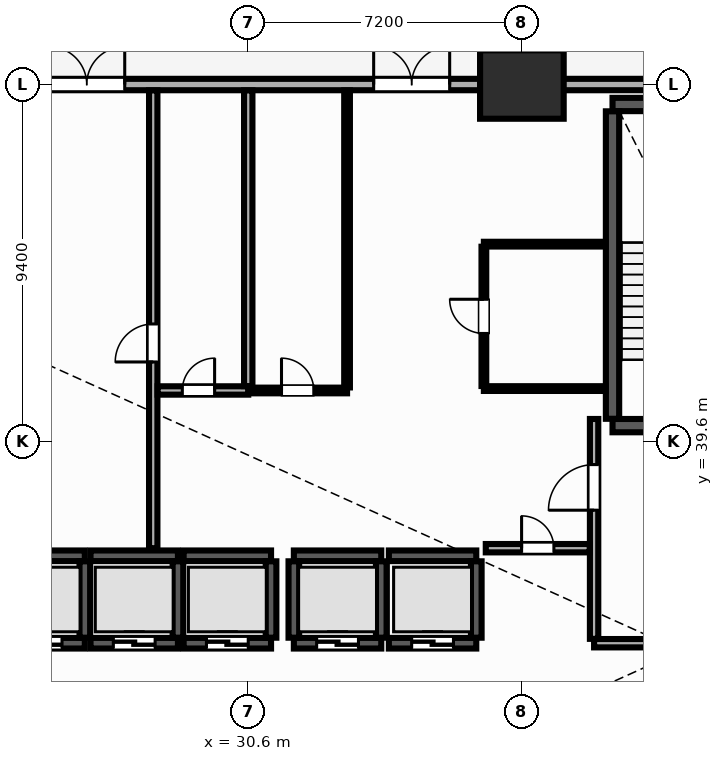
"""IFC4 building model, lengths in metres.
Left out: names, types, materials, properties, quantities, classifications, styles, units other than length and angle.
Written with IfcOpenShell. Run it as: python <this file> out.ifc"""

import sys

from ifc_helpers import new_model, si_unit, direction, frame, frame_2d, origin, origin_2d, place, context, subcontext, project, spatial, rectangle, extrude, element, fill, save


model = new_model("IFC4")
c1 = context("Model", 3, precision=1e-05, world=origin(), true_north=direction((0.0, 1.0)))
c2 = subcontext(c1, "Body", "Model", "MODEL_VIEW")
j1 = project(units=[si_unit("LENGTHUNIT", "METRE"), si_unit("PLANEANGLEUNIT", "RADIAN")], contexts=[c1])
p1 = place(None, origin())
s1 = spatial("IfcSite", under=j1, at=p1, CompositionType="ELEMENT")
p2 = place(p1, origin())
s2 = spatial("IfcBuilding", under=s1, at=p2, CompositionType="ELEMENT")
p3 = place(p2, origin())
s3 = spatial("IfcBuildingStorey", under=s2, at=p3, CompositionType="ELEMENT", Elevation=0.0)
p4 = place(p3, frame((37.8, 49.0, 0.0), z_axis=(0.0, 0.0, 1.0), x_axis=(1.0, 0.0, 0.0)))
e1 = element("IfcColumn", 1, at=p4, inside=s3, PredefinedType="USERDEFINED", context=c2, shape_type="SweptSolid", body=[
    extrude(rectangle(XDim=2.2, YDim=1.8, at=origin_2d()), origin(), (0.0, 0.0, 1.0), 7.68),
])
p5 = place(p3, frame((73.5, 49.0, 0.0), z_axis=(0.0, 0.0, 1.0), x_axis=(-1.0, 0.0, 0.0)))
e2 = element("IfcWall", 2, at=p5, inside=s3, PredefinedType="SOLIDWALL", context=c2, shape_type="SweptSolid", body=[
    extrude(rectangle(XDim=63.0, YDim=0.3, at=frame_2d((31.5, 0.0))), origin(), (0.0, 0.0, 1.0), 5.4),
])
p6 = place(p5, frame((46.15, 0.0, 0.0)))
e3 = element("IfcOpeningElement", 3, at=p6, cuts=e2, PredefinedType="OPENING", context=c2, shape_type="SweptSolid", body=[
    extrude(rectangle(XDim=2.0, YDim=2.4, at=frame_2d((1.0, 1.2))), frame((0.0, 0.16, 0.0), z_axis=(0.0, -1.0, 0.0), x_axis=(1.0, 0.0, 0.0)), (0.0, 0.0, 1.0), 0.32),
])
p7 = place(p5, frame((37.6, 0.0, 0.0)))
e4 = element("IfcOpeningElement", 4, at=p7, cuts=e2, PredefinedType="OPENING", context=c2, shape_type="SweptSolid", body=[
    extrude(rectangle(XDim=2.0, YDim=2.4, at=frame_2d((1.0, 1.2))), frame((0.0, 0.16, 0.0), z_axis=(0.0, -1.0, 0.0), x_axis=(1.0, 0.0, 0.0)), (0.0, 0.0, 1.0), 0.32),
])
p8 = place(p5, frame((16.65, 0.0, 0.0)))
e5 = element("IfcOpeningElement", 5, at=p8, cuts=e2, PredefinedType="OPENING", context=c2, shape_type="SweptSolid", body=[
    extrude(rectangle(XDim=2.0, YDim=2.4, at=frame_2d((1.0, 1.2))), frame((0.0, 0.16, 0.0), z_axis=(0.0, -1.0, 0.0), x_axis=(1.0, 0.0, 0.0)), (0.0, 0.0, 1.0), 0.32),
])
p9 = place(p3, frame((40.185, 40.025, 0.0), z_axis=(0.0, 0.0, 1.0), x_axis=(1.0, 0.0, 0.0)))
e6 = element("IfcWall", 6, at=p9, inside=s3, PredefinedType="SHEAR", context=c2, shape_type="SweptSolid", body=[
    extrude(rectangle(XDim=3.63, YDim=0.35, at=frame_2d((1.815, 0.0))), origin(), (0.0, 0.0, 1.0), 7.68),
])
p10 = place(p9, frame((1.24, 0.0, 0.0)))
e7 = element("IfcOpeningElement", 7, at=p10, cuts=e6, PredefinedType="OPENING", context=c2, shape_type="SweptSolid", body=[
    extrude(rectangle(XDim=1.15, YDim=2.15, at=frame_2d((0.575, 1.075))), frame((0.0, 0.185, 0.0), z_axis=(0.0, -1.0, 0.0), x_axis=(1.0, 0.0, 0.0)), (0.0, 0.0, 1.0), 0.37),
])
p11 = place(p3, frame((40.185, 48.475, 0.0), z_axis=(0.0, 0.0, 1.0), x_axis=(1.0, 0.0, 0.0)))
e8 = element("IfcWall", 8, at=p11, inside=s3, PredefinedType="SHEAR", context=c2, shape_type="SweptSolid", body=[
    extrude(rectangle(XDim=3.63, YDim=0.35, at=frame_2d((1.815, 0.0))), origin(), (0.0, 0.0, 1.0), 7.68),
])
p12 = place(p3, frame((40.185, 40.205, 0.0), z_axis=(0.0, 0.0, 1.0), x_axis=(0.0, 1.0, 0.0)))
e9 = element("IfcWall", 9, at=p12, inside=s3, PredefinedType="SHEAR", context=c2, shape_type="SweptSolid", body=[
    extrude(rectangle(XDim=8.09, YDim=0.35, at=frame_2d((4.045, 0.0))), origin(), (0.0, 0.0, 1.0), 7.68),
])
p13 = place(p3, frame((24.0, 34.3, 0.0), z_axis=(0.0, 0.0, 1.0), x_axis=(1.0, 0.0, 0.0)))
e10 = element("IfcWall", 10, at=p13, inside=s3, PredefinedType="SHEAR", context=c2, shape_type="SweptSolid", body=[
    extrude(rectangle(XDim=2.3, YDim=0.28, at=frame_2d((1.15, 0.0))), origin(), (0.0, 0.0, 1.0), 7.68),
])
p14 = place(p13, frame((0.6, 0.0, 0.0)))
e11 = element("IfcOpeningElement", 11, at=p14, cuts=e10, PredefinedType="OPENING", context=c2, shape_type="SweptSolid", body=[
    extrude(rectangle(XDim=1.1, YDim=2.2, at=frame_2d((0.55, 1.1))), frame((0.0, 0.15, 0.0), z_axis=(0.0, -1.0, 0.0), x_axis=(1.0, 0.0, 0.0)), (0.0, 0.0, 1.0), 0.3),
])
p15 = place(p3, frame((24.0, 36.6, 0.0), z_axis=(0.0, 0.0, 1.0), x_axis=(1.0, 0.0, 0.0)))
e12 = element("IfcWall", 12, at=p15, inside=s3, PredefinedType="SHEAR", context=c2, shape_type="SweptSolid", body=[
    extrude(rectangle(XDim=2.3, YDim=0.28, at=frame_2d((1.15, 0.0))), origin(), (0.0, 0.0, 1.0), 7.68),
])
p16 = place(p3, frame((26.3, 34.445, 0.0), z_axis=(0.0, 0.0, 1.0), x_axis=(0.0, 1.0, 0.0)))
e13 = element("IfcWall", 13, at=p16, inside=s3, PredefinedType="SHEAR", context=c2, shape_type="SweptSolid", body=[
    extrude(rectangle(XDim=2.01, YDim=0.28, at=frame_2d((1.005, 0.0))), origin(), (0.0, 0.0, 1.0), 7.68),
])
p17 = place(p3, frame((26.45, 34.3, 0.0), z_axis=(0.0, 0.0, 1.0), x_axis=(1.0, 0.0, 0.0)))
e14 = element("IfcWall", 14, at=p17, inside=s3, PredefinedType="SHEAR", context=c2, shape_type="SweptSolid", body=[
    extrude(rectangle(XDim=2.3, YDim=0.28, at=frame_2d((1.15, 0.0))), origin(), (0.0, 0.0, 1.0), 7.68),
])
p18 = place(p17, frame((0.6, 0.0, 0.0)))
e15 = element("IfcOpeningElement", 15, at=p18, cuts=e14, PredefinedType="OPENING", context=c2, shape_type="SweptSolid", body=[
    extrude(rectangle(XDim=1.1, YDim=2.2, at=frame_2d((0.55, 1.1))), frame((0.0, 0.15, 0.0), z_axis=(0.0, -1.0, 0.0), x_axis=(1.0, 0.0, 0.0)), (0.0, 0.0, 1.0), 0.3),
])
p19 = place(p3, frame((26.45, 36.6, 0.0), z_axis=(0.0, 0.0, 1.0), x_axis=(1.0, 0.0, 0.0)))
e16 = element("IfcWall", 16, at=p19, inside=s3, PredefinedType="SHEAR", context=c2, shape_type="SweptSolid", body=[
    extrude(rectangle(XDim=2.3, YDim=0.28, at=frame_2d((1.15, 0.0))), origin(), (0.0, 0.0, 1.0), 7.68),
])
p20 = place(p3, frame((28.75, 34.445, 0.0), z_axis=(0.0, 0.0, 1.0), x_axis=(0.0, 1.0, 0.0)))
e17 = element("IfcWall", 17, at=p20, inside=s3, PredefinedType="SHEAR", context=c2, shape_type="SweptSolid", body=[
    extrude(rectangle(XDim=2.01, YDim=0.28, at=frame_2d((1.005, 0.0))), origin(), (0.0, 0.0, 1.0), 7.68),
])
p21 = place(p3, frame((28.9, 34.3, 0.0), z_axis=(0.0, 0.0, 1.0), x_axis=(1.0, 0.0, 0.0)))
e18 = element("IfcWall", 18, at=p21, inside=s3, PredefinedType="SHEAR", context=c2, shape_type="SweptSolid", body=[
    extrude(rectangle(XDim=2.3, YDim=0.28, at=frame_2d((1.15, 0.0))), origin(), (0.0, 0.0, 1.0), 7.68),
])
p22 = place(p21, frame((0.6, 0.0, 0.0)))
e19 = element("IfcOpeningElement", 19, at=p22, cuts=e18, PredefinedType="OPENING", context=c2, shape_type="SweptSolid", body=[
    extrude(rectangle(XDim=1.1, YDim=2.2, at=frame_2d((0.55, 1.1))), frame((0.0, 0.15, 0.0), z_axis=(0.0, -1.0, 0.0), x_axis=(1.0, 0.0, 0.0)), (0.0, 0.0, 1.0), 0.3),
])
p23 = place(p3, frame((28.9, 36.6, 0.0), z_axis=(0.0, 0.0, 1.0), x_axis=(1.0, 0.0, 0.0)))
e20 = element("IfcWall", 20, at=p23, inside=s3, PredefinedType="SHEAR", context=c2, shape_type="SweptSolid", body=[
    extrude(rectangle(XDim=2.3, YDim=0.28, at=frame_2d((1.15, 0.0))), origin(), (0.0, 0.0, 1.0), 7.68),
])
p24 = place(p3, frame((31.2, 34.445, 0.0), z_axis=(0.0, 0.0, 1.0), x_axis=(0.0, 1.0, 0.0)))
e21 = element("IfcWall", 21, at=p24, inside=s3, PredefinedType="SHEAR", context=c2, shape_type="SweptSolid", body=[
    extrude(rectangle(XDim=2.01, YDim=0.28, at=frame_2d((1.005, 0.0))), origin(), (0.0, 0.0, 1.0), 7.68),
])
p25 = place(p3, frame((31.8, 34.3, 0.0), z_axis=(0.0, 0.0, 1.0), x_axis=(1.0, 0.0, 0.0)))
e22 = element("IfcWall", 22, at=p25, inside=s3, PredefinedType="SHEAR", context=c2, shape_type="SweptSolid", body=[
    extrude(rectangle(XDim=2.3, YDim=0.28, at=frame_2d((1.15, 0.0))), origin(), (0.0, 0.0, 1.0), 7.68),
])
p26 = place(p25, frame((0.6, 0.0, 0.0)))
e23 = element("IfcOpeningElement", 23, at=p26, cuts=e22, PredefinedType="OPENING", context=c2, shape_type="SweptSolid", body=[
    extrude(rectangle(XDim=1.1, YDim=2.2, at=frame_2d((0.55, 1.1))), frame((0.0, 0.15, 0.0), z_axis=(0.0, -1.0, 0.0), x_axis=(1.0, 0.0, 0.0)), (0.0, 0.0, 1.0), 0.3),
])
p27 = place(p3, frame((31.8, 36.6, 0.0), z_axis=(0.0, 0.0, 1.0), x_axis=(1.0, 0.0, 0.0)))
e24 = element("IfcWall", 24, at=p27, inside=s3, PredefinedType="SHEAR", context=c2, shape_type="SweptSolid", body=[
    extrude(rectangle(XDim=2.3, YDim=0.28, at=frame_2d((1.15, 0.0))), origin(), (0.0, 0.0, 1.0), 7.68),
])
for number, where, z_axis, x_axis in (
    (25, (31.8, 34.445, 0.0), (0.0, 0.0, 1.0), (0.0, 1.0, 0.0)),
    (26, (34.1, 34.445, 0.0), (0.0, 0.0, 1.0), (0.0, 1.0, 0.0)),
):
    element("IfcWall", number, at=place(p3, frame(where, z_axis=z_axis, x_axis=x_axis)), inside=s3, PredefinedType="SHEAR", context=c2, shape_type="SweptSolid", body=[
        extrude(rectangle(XDim=2.01, YDim=0.28, at=frame_2d((1.005, 0.0))), origin(), (0.0, 0.0, 1.0), 7.68),
    ])
p28 = place(p3, frame((34.3, 34.3, 0.0), z_axis=(0.0, 0.0, 1.0), x_axis=(1.0, 0.0, 0.0)))
e27 = element("IfcWall", 27, at=p28, inside=s3, PredefinedType="SHEAR", context=c2, shape_type="SweptSolid", body=[
    extrude(rectangle(XDim=2.3, YDim=0.28, at=frame_2d((1.15, 0.0))), origin(), (0.0, 0.0, 1.0), 7.68),
])
p29 = place(p28, frame((0.6, 0.0, 0.0)))
e28 = element("IfcOpeningElement", 28, at=p29, cuts=e27, PredefinedType="OPENING", context=c2, shape_type="SweptSolid", body=[
    extrude(rectangle(XDim=1.1, YDim=2.2, at=frame_2d((0.55, 1.1))), frame((0.0, 0.15, 0.0), z_axis=(0.0, -1.0, 0.0), x_axis=(1.0, 0.0, 0.0)), (0.0, 0.0, 1.0), 0.3),
])
p30 = place(p3, frame((34.3, 36.6, 0.0), z_axis=(0.0, 0.0, 1.0), x_axis=(1.0, 0.0, 0.0)))
e29 = element("IfcWall", 29, at=p30, inside=s3, PredefinedType="SHEAR", context=c2, shape_type="SweptSolid", body=[
    extrude(rectangle(XDim=2.3, YDim=0.28, at=frame_2d((1.15, 0.0))), origin(), (0.0, 0.0, 1.0), 7.68),
])
p31 = place(p3, frame((36.6, 34.445, 0.0), z_axis=(0.0, 0.0, 1.0), x_axis=(0.0, 1.0, 0.0)))
e30 = element("IfcWall", 30, at=p31, inside=s3, PredefinedType="SHEAR", context=c2, shape_type="SweptSolid", body=[
    extrude(rectangle(XDim=2.01, YDim=0.28, at=frame_2d((1.005, 0.0))), origin(), (0.0, 0.0, 1.0), 7.68),
])
p32 = place(p3, frame((39.7, 34.3, 0.0), z_axis=(0.0, 0.0, 1.0), x_axis=(1.0, 0.0, 0.0)))
e31 = element("IfcWall", 31, at=p32, inside=s3, PredefinedType="PARTITIONING", context=c2, shape_type="SweptSolid", body=[
    extrude(rectangle(XDim=4.6, YDim=0.22, at=frame_2d((2.3, 0.0))), origin(), (0.0, 0.0, 1.0), 7.68),
])
p33 = place(p32, frame((1.7, 0.0, 0.0)))
e32 = element("IfcOpeningElement", 32, at=p33, cuts=e31, PredefinedType="OPENING", context=c2, shape_type="SweptSolid", body=[
    extrude(rectangle(XDim=1.2, YDim=2.15, at=frame_2d((0.6, 1.075))), frame((0.0, 0.12, 0.0), z_axis=(0.0, -1.0, 0.0), x_axis=(1.0, 0.0, 0.0)), (0.0, 0.0, 1.0), 0.24),
])
p34 = place(p3, frame((39.7, 34.415, 0.0), z_axis=(0.0, 0.0, 1.0), x_axis=(0.0, 1.0, 0.0)))
e33 = element("IfcWall", 33, at=p34, inside=s3, PredefinedType="PARTITIONING", context=c2, shape_type="SweptSolid", body=[
    extrude(rectangle(XDim=5.785, YDim=0.22, at=frame_2d((2.893, 0.0))), origin(), (0.0, 0.0, 1.0), 7.68),
])
p35 = place(p34, frame((3.385, 0.0, 0.0)))
e34 = element("IfcOpeningElement", 34, at=p35, cuts=e33, PredefinedType="OPENING", context=c2, shape_type="SweptSolid", body=[
    extrude(rectangle(XDim=1.2, YDim=2.15, at=frame_2d((0.6, 1.075))), frame((0.0, 0.12, 0.0), z_axis=(0.0, -1.0, 0.0), x_axis=(1.0, 0.0, 0.0)), (0.0, 0.0, 1.0), 0.24),
])
p36 = place(p3, frame((28.1, 36.8, 0.0), z_axis=(0.0, 0.0, 1.0), x_axis=(0.0, 1.0, 0.0)))
e35 = element("IfcWall", 35, at=p36, inside=s3, PredefinedType="PARTITIONING", context=c2, shape_type="SweptSolid", body=[
    extrude(rectangle(XDim=12.045, YDim=0.22, at=frame_2d((6.022, 0.0))), origin(), (0.0, 0.0, 1.0), 7.68),
])
p37 = place(p36, frame((4.9, 0.0, 0.0)))
e36 = element("IfcOpeningElement", 36, at=p37, cuts=e35, PredefinedType="OPENING", context=c2, shape_type="SweptSolid", body=[
    extrude(rectangle(XDim=1.0, YDim=2.15, at=frame_2d((0.5, 1.075))), frame((0.0, 0.12, 0.0), z_axis=(0.0, -1.0, 0.0), x_axis=(1.0, 0.0, 0.0)), (0.0, 0.0, 1.0), 0.24),
])
p38 = place(p3, frame((28.215, 40.95, 0.0), z_axis=(0.0, 0.0, 1.0), x_axis=(1.0, 0.0, 0.0)))
e37 = element("IfcWall", 37, at=p38, inside=s3, PredefinedType="PARTITIONING", context=c2, shape_type="SweptSolid", body=[
    extrude(rectangle(XDim=2.385, YDim=0.22, at=frame_2d((1.192, 0.0))), origin(), (0.0, 0.0, 1.0), 7.68),
])
p39 = place(p38, frame((0.65, 0.0, 0.0)))
e38 = element("IfcOpeningElement", 38, at=p39, cuts=e37, PredefinedType="OPENING", context=c2, shape_type="SweptSolid", body=[
    extrude(rectangle(XDim=0.85, YDim=2.1, at=frame_2d((0.425, 1.05))), frame((0.0, 0.12, 0.0), z_axis=(0.0, -1.0, 0.0), x_axis=(1.0, 0.0, 0.0)), (0.0, 0.0, 1.0), 0.24),
])
p40 = place(p3, frame((30.6, 41.065, 0.0), z_axis=(0.0, 0.0, 1.0), x_axis=(0.0, 1.0, 0.0)))
e39 = element("IfcWall", 39, at=p40, inside=s3, PredefinedType="PARTITIONING", context=c2, shape_type="SweptSolid", body=[
    extrude(rectangle(XDim=7.78, YDim=0.22, at=frame_2d((3.89, 0.0))), origin(), (0.0, 0.0, 1.0), 7.68),
])
p41 = place(p3, frame((30.61, 40.95, 0.0), z_axis=(0.0, 0.0, 1.0), x_axis=(1.0, 0.0, 0.0)))
e40 = element("IfcWall", 40, at=p41, inside=s3, PredefinedType="PARTITIONING", context=c2, shape_type="SweptSolid", body=[
    extrude(rectangle(XDim=2.59, YDim=0.15, at=frame_2d((1.295, 0.0))), origin(), (0.0, 0.0, 1.0), 7.68),
])
p42 = place(p41, frame((0.865, 0.0, 0.0)))
e41 = element("IfcOpeningElement", 41, at=p42, cuts=e40, PredefinedType="OPENING", context=c2, shape_type="SweptSolid", body=[
    extrude(rectangle(XDim=0.85, YDim=2.1, at=frame_2d((0.425, 1.05))), frame((0.0, 0.085, 0.0), z_axis=(0.0, -1.0, 0.0), x_axis=(1.0, 0.0, 0.0)), (0.0, 0.0, 1.0), 0.17),
])
p43 = place(p3, frame((33.2, 41.03, 0.0), z_axis=(0.0, 0.0, 1.0), x_axis=(0.0, 1.0, 0.0)))
e42 = element("IfcWall", 42, at=p43, inside=s3, PredefinedType="PARTITIONING", context=c2, shape_type="SweptSolid", body=[
    extrude(rectangle(XDim=7.815, YDim=0.15, at=frame_2d((3.907, 0.0))), origin(), (0.0, 0.0, 1.0), 7.68),
])
for number, where, z_axis, x_axis in (
    (43, (36.8, 41.0, 0.0), (0.0, 0.0, 1.0), (1.0, 0.0, 0.0)),
    (44, (36.8, 44.8, 0.0), (0.0, 0.0, 1.0), (1.0, 0.0, 0.0)),
):
    element("IfcWall", number, at=place(p3, frame(where, z_axis=z_axis, x_axis=x_axis)), inside=s3, PredefinedType="PARTITIONING", context=c2, shape_type="SweptSolid", body=[
        extrude(rectangle(XDim=3.2, YDim=0.125, at=frame_2d((1.6, 0.0))), origin(), (0.0, 0.0, 1.0), 7.68),
    ])
p44 = place(p3, frame((36.8, 41.067, 0.0), z_axis=(0.0, 0.0, 1.0), x_axis=(0.0, 1.0, 0.0)))
e45 = element("IfcWall", 45, at=p44, inside=s3, PredefinedType="PARTITIONING", context=c2, shape_type="SweptSolid", body=[
    extrude(rectangle(XDim=3.665, YDim=0.125, at=frame_2d((1.833, 0.0))), origin(), (0.0, 0.0, 1.0), 7.68),
])
p45 = place(p44, frame((1.383, 0.0, 0.0)))
e46 = element("IfcOpeningElement", 46, at=p45, cuts=e45, PredefinedType="OPENING", context=c2, shape_type="SweptSolid", body=[
    extrude(rectangle(XDim=0.9, YDim=2.1, at=frame_2d((0.45, 1.05))), frame((0.0, 0.073, 0.0), z_axis=(0.0, -1.0, 0.0), x_axis=(1.0, 0.0, 0.0)), (0.0, 0.0, 1.0), 0.145),
])
p46 = place(p3, frame((36.85, 36.8, 0.0), z_axis=(0.0, 0.0, 1.0), x_axis=(1.0, 0.0, 0.0)))
e47 = element("IfcWall", 47, at=p46, inside=s3, PredefinedType="PARTITIONING", context=c2, shape_type="SweptSolid", body=[
    extrude(rectangle(XDim=2.735, YDim=0.22, at=frame_2d((1.367, 0.0))), origin(), (0.0, 0.0, 1.0), 7.68),
])
p47 = place(p46, frame((0.942, 0.0, 0.0)))
e48 = element("IfcOpeningElement", 48, at=p47, cuts=e47, PredefinedType="OPENING", context=c2, shape_type="SweptSolid", body=[
    extrude(rectangle(XDim=0.85, YDim=2.1, at=frame_2d((0.425, 1.05))), frame((0.0, 0.12, 0.0), z_axis=(0.0, -1.0, 0.0), x_axis=(1.0, 0.0, 0.0)), (0.0, 0.0, 1.0), 0.24),
])
p48 = place(p14, origin())
e49 = element("IfcDoor", 49, at=p48, inside=s3, OperationType="DOUBLE_DOOR_SLIDING", PredefinedType="DOOR", context=c2, shape_type="SweptSolid", body=[
    extrude(rectangle(XDim=1.1, YDim=2.2, at=frame_2d((0.55, 1.1))), frame((0.0, 0.025, 0.0), z_axis=(0.0, -1.0, 0.0), x_axis=(1.0, 0.0, 0.0)), (0.0, 0.0, 1.0), 0.05),
])
fill(e11, e49)
p49 = place(p18, origin())
e50 = element("IfcDoor", 50, at=p49, inside=s3, OperationType="DOUBLE_DOOR_SLIDING", PredefinedType="DOOR", context=c2, shape_type="SweptSolid", body=[
    extrude(rectangle(XDim=1.1, YDim=2.2, at=frame_2d((0.55, 1.1))), frame((0.0, 0.025, 0.0), z_axis=(0.0, -1.0, 0.0), x_axis=(1.0, 0.0, 0.0)), (0.0, 0.0, 1.0), 0.05),
])
fill(e15, e50)
p50 = place(p22, origin())
e51 = element("IfcDoor", 51, at=p50, inside=s3, OperationType="DOUBLE_DOOR_SLIDING", PredefinedType="DOOR", context=c2, shape_type="SweptSolid", body=[
    extrude(rectangle(XDim=1.1, YDim=2.2, at=frame_2d((0.55, 1.1))), frame((0.0, 0.025, 0.0), z_axis=(0.0, -1.0, 0.0), x_axis=(1.0, 0.0, 0.0)), (0.0, 0.0, 1.0), 0.05),
])
fill(e19, e51)
p51 = place(p26, origin())
e52 = element("IfcDoor", 52, at=p51, inside=s3, OperationType="DOUBLE_DOOR_SLIDING", PredefinedType="DOOR", context=c2, shape_type="SweptSolid", body=[
    extrude(rectangle(XDim=1.1, YDim=2.2, at=frame_2d((0.55, 1.1))), frame((0.0, 0.025, 0.0), z_axis=(0.0, -1.0, 0.0), x_axis=(1.0, 0.0, 0.0)), (0.0, 0.0, 1.0), 0.05),
])
fill(e23, e52)
p52 = place(p29, origin())
e53 = element("IfcDoor", 53, at=p52, inside=s3, OperationType="DOUBLE_DOOR_SLIDING", PredefinedType="DOOR", context=c2, shape_type="SweptSolid", body=[
    extrude(rectangle(XDim=1.1, YDim=2.2, at=frame_2d((0.55, 1.1))), frame((0.0, 0.025, 0.0), z_axis=(0.0, -1.0, 0.0), x_axis=(1.0, 0.0, 0.0)), (0.0, 0.0, 1.0), 0.05),
])
fill(e28, e53)
p53 = place(p37, origin())
e54 = element("IfcDoor", 54, at=p53, inside=s3, OperationType="SINGLE_SWING_LEFT", PredefinedType="DOOR", context=c2, shape_type="SweptSolid", body=[
    extrude(rectangle(XDim=1.0, YDim=2.15, at=frame_2d((0.5, 1.075))), frame((0.0, 0.025, 0.0), z_axis=(0.0, -1.0, 0.0), x_axis=(1.0, 0.0, 0.0)), (0.0, 0.0, 1.0), 0.05),
])
fill(e36, e54)
p54 = place(p39, origin())
e55 = element("IfcDoor", 55, at=p54, inside=s3, OperationType="SINGLE_SWING_RIGHT", PredefinedType="DOOR", context=c2, shape_type="SweptSolid", body=[
    extrude(rectangle(XDim=0.85, YDim=2.1, at=frame_2d((0.425, 1.05))), frame((0.0, 0.025, 0.0), z_axis=(0.0, -1.0, 0.0), x_axis=(1.0, 0.0, 0.0)), (0.0, 0.0, 1.0), 0.05),
])
fill(e38, e55)
p55 = place(p42, origin())
e56 = element("IfcDoor", 56, at=p55, inside=s3, OperationType="SINGLE_SWING_LEFT", PredefinedType="DOOR", context=c2, shape_type="SweptSolid", body=[
    extrude(rectangle(XDim=0.85, YDim=2.1, at=frame_2d((0.425, 1.05))), frame((0.0, 0.025, 0.0), z_axis=(0.0, -1.0, 0.0), x_axis=(1.0, 0.0, 0.0)), (0.0, 0.0, 1.0), 0.05),
])
fill(e41, e56)
p56 = place(p45, origin())
e57 = element("IfcDoor", 57, at=p56, inside=s3, OperationType="SINGLE_SWING_RIGHT", PredefinedType="DOOR", context=c2, shape_type="SweptSolid", body=[
    extrude(rectangle(XDim=0.9, YDim=2.1, at=frame_2d((0.45, 1.05))), frame((0.0, 0.025, 0.0), z_axis=(0.0, -1.0, 0.0), x_axis=(1.0, 0.0, 0.0)), (0.0, 0.0, 1.0), 0.05),
])
fill(e46, e57)
p57 = place(p47, origin())
e58 = element("IfcDoor", 58, at=p57, inside=s3, OperationType="SINGLE_SWING_LEFT", PredefinedType="DOOR", context=c2, shape_type="SweptSolid", body=[
    extrude(rectangle(XDim=0.85, YDim=2.1, at=frame_2d((0.425, 1.05))), frame((0.0, 0.025, 0.0), z_axis=(0.0, -1.0, 0.0), x_axis=(1.0, 0.0, 0.0)), (0.0, 0.0, 1.0), 0.05),
])
fill(e48, e58)
p58 = place(p35, origin())
e59 = element("IfcDoor", 59, at=p58, inside=s3, OperationType="SINGLE_SWING_LEFT", PredefinedType="DOOR", context=c2, shape_type="SweptSolid", body=[
    extrude(rectangle(XDim=1.2, YDim=2.15, at=frame_2d((0.6, 1.075))), frame((0.0, 0.025, 0.0), z_axis=(0.0, -1.0, 0.0), x_axis=(1.0, 0.0, 0.0)), (0.0, 0.0, 1.0), 0.05),
])
fill(e34, e59)
p59 = place(p6, frame((2.0, 0.0, 0.0), z_axis=(0.0, 0.0, 1.0), x_axis=(-1.0, 0.0, 0.0)))
e60 = element("IfcDoor", 60, at=p59, inside=s3, OperationType="DOUBLE_DOOR_SINGLE_SWING", PredefinedType="DOOR", context=c2, shape_type="SweptSolid", body=[
    extrude(rectangle(XDim=2.0, YDim=2.4, at=frame_2d((1.0, 1.2))), frame((0.0, 0.025, 0.0), z_axis=(0.0, -1.0, 0.0), x_axis=(1.0, 0.0, 0.0)), (0.0, 0.0, 1.0), 0.05),
])
fill(e3, e60)
p60 = place(p7, frame((2.0, 0.0, 0.0), z_axis=(0.0, 0.0, 1.0), x_axis=(-1.0, 0.0, 0.0)))
e61 = element("IfcDoor", 61, at=p60, inside=s3, OperationType="DOUBLE_DOOR_SINGLE_SWING", PredefinedType="DOOR", context=c2, shape_type="SweptSolid", body=[
    extrude(rectangle(XDim=2.0, YDim=2.4, at=frame_2d((1.0, 1.2))), frame((0.0, 0.025, 0.0), z_axis=(0.0, -1.0, 0.0), x_axis=(1.0, 0.0, 0.0)), (0.0, 0.0, 1.0), 0.05),
])
fill(e4, e61)
save(model, sys.argv[1])
